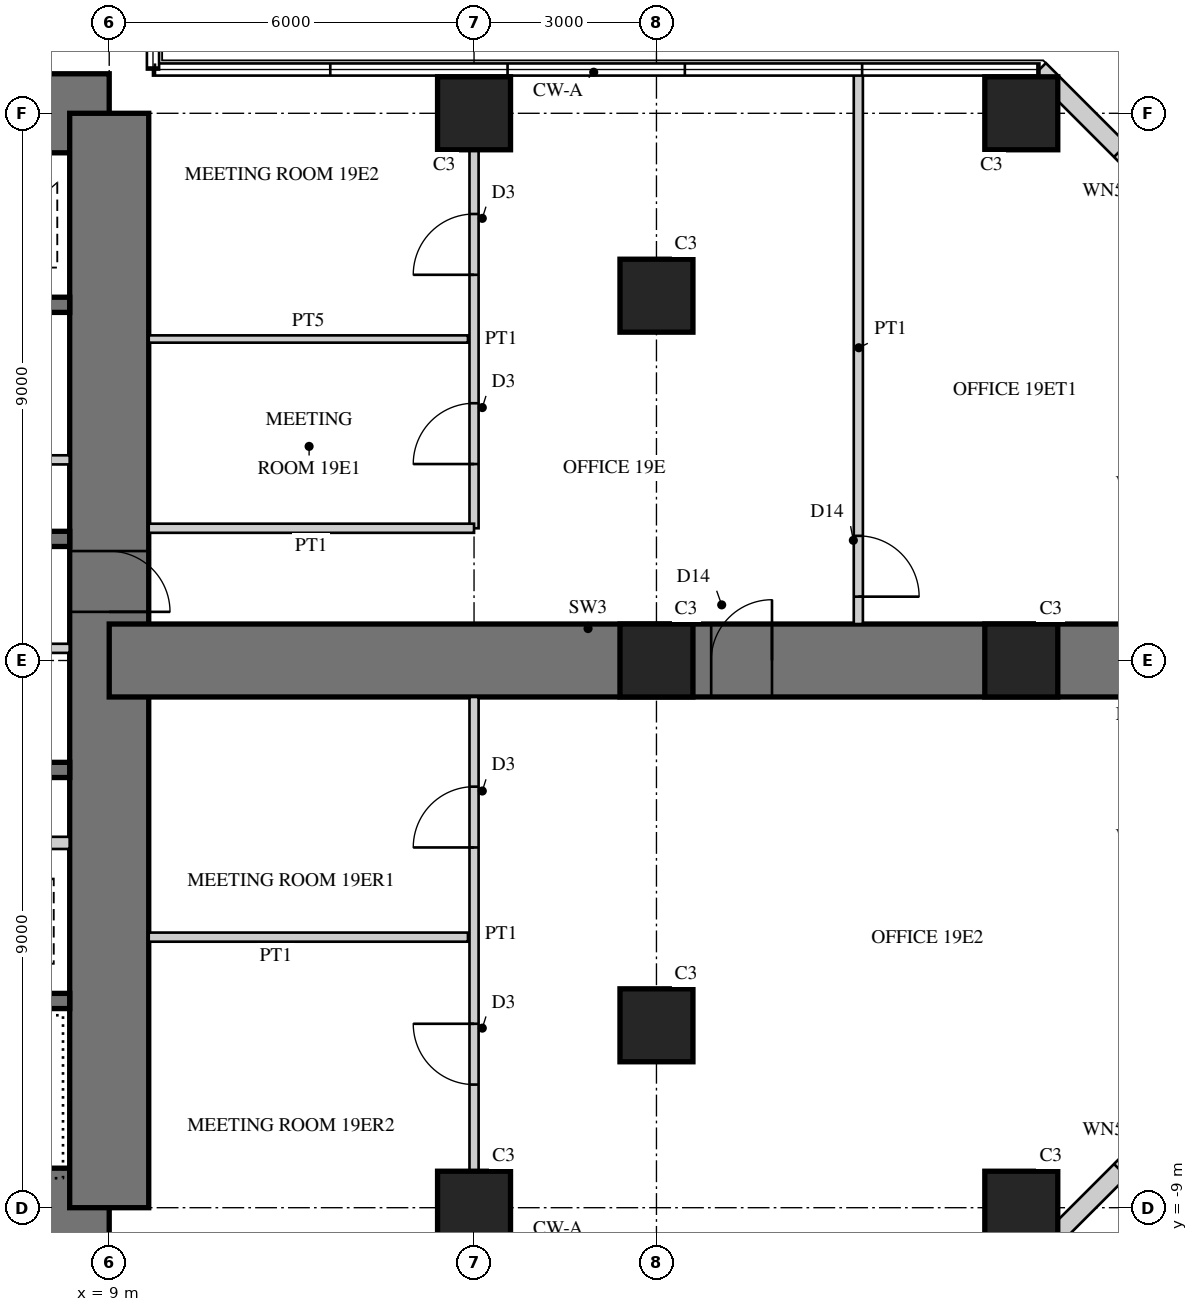
"""IFC4 building model, lengths in metres.
Left out: names, types, materials, properties, quantities, classifications, styles, units other than length and angle.
Written with IfcOpenShell. Run it as: python <this file> out.ifc"""

import sys

from ifc_helpers import new_model, si_unit, direction, frame, frame_2d, origin, origin_2d, place, context, subcontext, project, spatial, rectangle, extrude, element, fill, save


model = new_model("IFC4")
c1 = context("Model", 3, precision=1e-05, world=origin(), true_north=direction((0.0, 1.0)))
c2 = subcontext(c1, "Body", "Model", "MODEL_VIEW")
j1 = project(units=[si_unit("LENGTHUNIT", "METRE"), si_unit("PLANEANGLEUNIT", "RADIAN")], contexts=[c1])
p1 = place(None, origin())
s1 = spatial("IfcSite", under=j1, at=p1, CompositionType="ELEMENT")
p2 = place(p1, origin())
s2 = spatial("IfcBuilding", under=s1, at=p2, CompositionType="ELEMENT")
p3 = place(p2, frame((0.0, 0.0, 79.5)))
s3 = spatial("IfcBuildingStorey", under=s2, at=p3, CompositionType="ELEMENT", Elevation=79.5)
p4 = place(p3, frame((9.0, 9.0, 0.0), z_axis=(0.0, 0.0, 1.0), x_axis=(-1.0, 0.0, 0.0)))
e1 = element("IfcWall", 1, at=p4, inside=s3, PredefinedType="SHEAR", context=c2, shape_type="SweptSolid", body=[
    extrude(rectangle(XDim=18.0, YDim=1.3, at=frame_2d((9.0, 0.0))), origin(), (0.0, 0.0, 1.0), 4.0),
])
p5 = place(p4, frame((9.8, 0.0, 0.0)))
e2 = element("IfcOpeningElement", 2, at=p5, cuts=e1, PredefinedType="OPENING", context=c2, shape_type="SweptSolid", body=[
    extrude(rectangle(XDim=1.0, YDim=2.4, at=frame_2d((0.5, 1.2))), frame((0.0, 0.66, 0.0), z_axis=(0.0, -1.0, 0.0), x_axis=(1.0, 0.0, 0.0)), (0.0, 0.0, 1.0), 1.32),
])
p6 = place(p3, frame((-9.0, -9.0, 0.0), z_axis=(0.0, 0.0, 1.0), x_axis=(1.0, 0.0, 0.0)))
e3 = element("IfcWall", 3, at=p6, inside=s3, PredefinedType="SHEAR", context=c2, shape_type="SweptSolid", body=[
    extrude(rectangle(XDim=18.0, YDim=1.3, at=frame_2d((9.0, 0.0))), origin(), (0.0, 0.0, 1.0), 4.0),
])
p7 = place(p6, frame((9.8, 0.0, 0.0)))
e4 = element("IfcOpeningElement", 4, at=p7, cuts=e3, PredefinedType="OPENING", context=c2, shape_type="SweptSolid", body=[
    extrude(rectangle(XDim=1.0, YDim=2.4, at=frame_2d((0.5, 1.2))), frame((0.0, 0.66, 0.0), z_axis=(0.0, -1.0, 0.0), x_axis=(1.0, 0.0, 0.0)), (0.0, 0.0, 1.0), 1.32),
])
p8 = place(p3, frame((9.0, -9.0, 0.0), z_axis=(0.0, 0.0, 1.0), x_axis=(0.0, 1.0, 0.0)))
e5 = element("IfcWall", 5, at=p8, inside=s3, PredefinedType="SHEAR", context=c2, shape_type="SweptSolid", body=[
    extrude(rectangle(XDim=18.0, YDim=1.3, at=frame_2d((9.0, 0.0))), origin(), (0.0, 0.0, 1.0), 4.0),
])
p9 = place(p8, frame((9.8, 0.0, 0.0)))
e6 = element("IfcOpeningElement", 6, at=p9, cuts=e5, PredefinedType="OPENING", context=c2, shape_type="SweptSolid", body=[
    extrude(rectangle(XDim=1.0, YDim=2.4, at=frame_2d((0.5, 1.2))), frame((0.0, 0.66, 0.0), z_axis=(0.0, -1.0, 0.0), x_axis=(1.0, 0.0, 0.0)), (0.0, 0.0, 1.0), 1.32),
])
p10 = place(p3, frame((1.925, 2.0, 0.0), z_axis=(0.0, 0.0, 1.0), x_axis=(1.0, 0.0, 0.0)))
e7 = element("IfcWall", 7, at=p10, inside=s3, PredefinedType="SHEAR", context=c2, shape_type="SweptSolid", body=[
    extrude(rectangle(XDim=6.425, YDim=0.25, at=frame_2d((3.212, 0.0))), origin(), (0.0, 0.0, 1.0), 4.0),
])
p11 = place(p3, frame((1.925, 5.85, 0.0), z_axis=(0.0, 0.0, 1.0), x_axis=(1.0, 0.0, 0.0)))
e8 = element("IfcWall", 8, at=p11, inside=s3, PredefinedType="SHEAR", context=c2, shape_type="SweptSolid", body=[
    extrude(rectangle(XDim=6.425, YDim=0.25, at=frame_2d((3.212, 0.0))), origin(), (0.0, 0.0, 1.0), 4.0),
])
p12 = place(p11, frame((0.454, 0.0, 0.0)))
e9 = element("IfcOpeningElement", 9, at=p12, cuts=e8, PredefinedType="OPENING", context=c2, shape_type="SweptSolid", body=[
    extrude(rectangle(XDim=1.1, YDim=2.2, at=frame_2d((0.55, 1.1))), frame((0.0, 0.135, 0.0), z_axis=(0.0, -1.0, 0.0), x_axis=(1.0, 0.0, 0.0)), (0.0, 0.0, 1.0), 0.27),
])
p13 = place(p11, frame((2.663, 0.0, 0.0)))
e10 = element("IfcOpeningElement", 10, at=p13, cuts=e8, PredefinedType="OPENING", context=c2, shape_type="SweptSolid", body=[
    extrude(rectangle(XDim=1.1, YDim=2.2, at=frame_2d((0.55, 1.1))), frame((0.0, 0.135, 0.0), z_axis=(0.0, -1.0, 0.0), x_axis=(1.0, 0.0, 0.0)), (0.0, 0.0, 1.0), 0.27),
])
p14 = place(p11, frame((4.871, 0.0, 0.0)))
e11 = element("IfcOpeningElement", 11, at=p14, cuts=e8, PredefinedType="OPENING", context=c2, shape_type="SweptSolid", body=[
    extrude(rectangle(XDim=1.1, YDim=2.2, at=frame_2d((0.55, 1.1))), frame((0.0, 0.135, 0.0), z_axis=(0.0, -1.0, 0.0), x_axis=(1.0, 0.0, 0.0)), (0.0, 0.0, 1.0), 0.27),
])
p15 = place(p3, frame((1.925, 3.3, 0.0), z_axis=(0.0, 0.0, 1.0), x_axis=(1.0, 0.0, 0.0)))
e12 = element("IfcWall", 12, at=p15, inside=s3, PredefinedType="PARTITIONING", context=c2, shape_type="SweptSolid", body=[
    extrude(rectangle(XDim=6.425, YDim=0.15, at=frame_2d((3.212, 0.0))), origin(), (0.0, 0.0, 1.0), 4.0),
])
p16 = place(p15, frame((0.075, 0.0, 0.0)))
e13 = element("IfcOpeningElement", 13, at=p16, cuts=e12, PredefinedType="OPENING", context=c2, shape_type="SweptSolid", body=[
    extrude(rectangle(XDim=0.8, YDim=2.1, at=frame_2d((0.4, 1.05))), frame((0.0, 0.085, 0.0), z_axis=(0.0, -1.0, 0.0), x_axis=(1.0, 0.0, 0.0)), (0.0, 0.0, 1.0), 0.17),
])
p17 = place(p15, frame((3.675, 0.0, 0.0)))
e14 = element("IfcOpeningElement", 14, at=p17, cuts=e12, PredefinedType="OPENING", context=c2, shape_type="SweptSolid", body=[
    extrude(rectangle(XDim=0.8, YDim=2.1, at=frame_2d((0.4, 1.05))), frame((0.0, 0.085, 0.0), z_axis=(0.0, -1.0, 0.0), x_axis=(1.0, 0.0, 0.0)), (0.0, 0.0, 1.0), 0.17),
])
p18 = place(p3, frame((2.125, -1.8, 0.0), z_axis=(0.0, 0.0, 1.0), x_axis=(1.0, 0.0, 0.0)))
e15 = element("IfcWall", 15, at=p18, inside=s3, PredefinedType="SHEAR", context=c2, shape_type="SweptSolid", body=[
    extrude(rectangle(XDim=6.225, YDim=0.25, at=frame_2d((3.113, 0.0))), origin(), (0.0, 0.0, 1.0), 4.0),
])
p19 = place(p3, frame((2.125, -5.6, 0.0), z_axis=(0.0, 0.0, 1.0), x_axis=(1.0, 0.0, 0.0)))
e16 = element("IfcWall", 16, at=p19, inside=s3, PredefinedType="SHEAR", context=c2, shape_type="SweptSolid", body=[
    extrude(rectangle(XDim=6.225, YDim=0.25, at=frame_2d((3.113, 0.0))), origin(), (0.0, 0.0, 1.0), 4.0),
])
p20 = place(p19, frame((0.175, 0.0, 0.0)))
e17 = element("IfcOpeningElement", 17, at=p20, cuts=e16, PredefinedType="OPENING", context=c2, shape_type="SweptSolid", body=[
    extrude(rectangle(XDim=1.0, YDim=2.1, at=frame_2d((0.5, 1.05))), frame((0.0, 0.135, 0.0), z_axis=(0.0, -1.0, 0.0), x_axis=(1.0, 0.0, 0.0)), (0.0, 0.0, 1.0), 0.27),
])
p21 = place(p3, frame((5.725, -3.0, 0.0), z_axis=(0.0, 0.0, 1.0), x_axis=(1.0, 0.0, 0.0)))
e18 = element("IfcWall", 18, at=p21, inside=s3, PredefinedType="PARTITIONING", context=c2, shape_type="SweptSolid", body=[
    extrude(rectangle(XDim=2.625, YDim=0.2, at=frame_2d((1.312, 0.0))), origin(), (0.0, 0.0, 1.0), 4.0),
])
p22 = place(p3, frame((9.0, 0.0, 0.0), z_axis=(0.0, 0.0, 1.0), x_axis=(1.0, 0.0, 0.0)))
e19 = element("IfcWall", 19, at=p22, inside=s3, PredefinedType="SHEAR", context=c2, shape_type="SweptSolid", body=[
    extrude(rectangle(XDim=18.0, YDim=1.2, at=frame_2d((9.0, 0.0))), origin(), (0.0, 0.0, 1.0), 4.0),
])
p23 = place(p22, frame((9.9, 0.0, 0.0)))
e20 = element("IfcOpeningElement", 20, at=p23, cuts=e19, PredefinedType="OPENING", context=c2, shape_type="SweptSolid", body=[
    extrude(rectangle(XDim=1.0, YDim=2.2, at=frame_2d((0.5, 1.1))), frame((0.0, 0.61, 0.0), z_axis=(0.0, -1.0, 0.0), x_axis=(1.0, 0.0, 0.0)), (0.0, 0.0, 1.0), 1.22),
])
for number, where, z_axis, x_axis in (
    (21, (15.0, -9.0, 0.0), (0.0, 0.0, 1.0), (1.0, 0.0, 0.0)),
    (22, (24.0, -9.0, 0.0), (0.0, 0.0, 1.0), (1.0, 0.0, 0.0)),
    (23, (15.0, 9.0, 0.0), (0.0, 0.0, 1.0), (1.0, 0.0, 0.0)),
    (24, (24.0, 9.0, 0.0), (0.0, 0.0, 1.0), (1.0, 0.0, 0.0)),
    (25, (18.0, -6.0, 0.0), (0.0, 0.0, 1.0), (1.0, 0.0, 0.0)),
    (26, (18.0, 0.0, 0.0), (0.0, 0.0, 1.0), (1.0, 0.0, 0.0)),
    (27, (18.0, 6.0, 0.0), (0.0, 0.0, 1.0), (1.0, 0.0, 0.0)),
    (28, (24.0, 0.0, 0.0), (0.0, 0.0, 1.0), (1.0, 0.0, 0.0)),
):
    element("IfcColumn", number, at=place(p3, frame(where, z_axis=z_axis, x_axis=x_axis)), inside=s3, PredefinedType="COLUMN", context=c2, shape_type="SweptSolid", body=[
        extrude(rectangle(XDim=1.2, YDim=1.2, at=origin_2d()), origin(), (0.0, 0.0, 1.0), 4.0),
    ])
p24 = place(p3, frame((24.298, -9.72, 0.0), z_axis=(0.0, 0.0, 1.0), x_axis=(0.707106781187, 0.707106781187, 0.0)))
e29 = element("IfcWall", 29, at=p24, inside=s3, PredefinedType="SOLIDWALL", context=c2, shape_type="SweptSolid", body=[
    extrude(rectangle(XDim=4.669, YDim=0.3, at=frame_2d((2.335, 0.0))), origin(), (0.0, 0.0, 1.0), 3.8),
])
p25 = place(p24, frame((1.885, 0.0, 0.3)))
e30 = element("IfcOpeningElement", 30, at=p25, cuts=e29, PredefinedType="OPENING", context=c2, shape_type="SweptSolid", body=[
    extrude(rectangle(XDim=0.9, YDim=2.4, at=frame_2d((0.45, 1.2))), frame((0.0, 0.16, 0.0), z_axis=(0.0, -1.0, 0.0), x_axis=(1.0, 0.0, 0.0)), (0.0, 0.0, 1.0), 0.32),
])
p26 = place(p3, frame((27.6, 6.418, 0.0), z_axis=(0.0, 0.0, 1.0), x_axis=(-0.707106781187, 0.707106781187, 0.0)))
e31 = element("IfcWall", 31, at=p26, inside=s3, PredefinedType="SOLIDWALL", context=c2, shape_type="SweptSolid", body=[
    extrude(rectangle(XDim=4.669, YDim=0.3, at=frame_2d((2.335, 0.0))), origin(), (0.0, 0.0, 1.0), 3.8),
])
p27 = place(p26, frame((1.885, 0.0, 0.3)))
e32 = element("IfcOpeningElement", 32, at=p27, cuts=e31, PredefinedType="OPENING", context=c2, shape_type="SweptSolid", body=[
    extrude(rectangle(XDim=0.9, YDim=2.4, at=frame_2d((0.45, 1.2))), frame((0.0, 0.16, 0.0), z_axis=(0.0, -1.0, 0.0), x_axis=(1.0, 0.0, 0.0)), (0.0, 0.0, 1.0), 0.32),
])
p28 = place(p3, frame((2.325, 0.2, 0.0), z_axis=(0.0, 0.0, 1.0), x_axis=(1.0, 0.0, 0.0)))
e33 = element("IfcWall", 33, at=p28, inside=s3, PredefinedType="PARTITIONING", context=c2, shape_type="SweptSolid", body=[
    extrude(rectangle(XDim=6.025, YDim=0.15, at=frame_2d((3.013, 0.0))), origin(), (0.0, 0.0, 1.0), 3.8),
])
p29 = place(p28, frame((0.4, 0.0, 0.0)))
e34 = element("IfcOpeningElement", 34, at=p29, cuts=e33, PredefinedType="OPENING", context=c2, shape_type="SweptSolid", body=[
    extrude(rectangle(XDim=1.0, YDim=2.1, at=frame_2d((0.5, 1.05))), frame((0.0, 0.085, 0.0), z_axis=(0.0, -1.0, 0.0), x_axis=(1.0, 0.0, 0.0)), (0.0, 0.0, 1.0), 0.17),
])
p30 = place(p3, frame((15.0, 2.175, 0.0), z_axis=(0.0, 0.0, 1.0), x_axis=(0.0, 1.0, 0.0)))
e35 = element("IfcWall", 35, at=p30, inside=s3, PredefinedType="PARTITIONING", context=c2, shape_type="SweptSolid", body=[
    extrude(rectangle(XDim=6.225, YDim=0.15, at=frame_2d((3.112, 0.0))), origin(), (0.0, 0.0, 1.0), 2.95),
])
p31 = place(p30, frame((1.056, 0.0, 0.0)))
e36 = element("IfcOpeningElement", 36, at=p31, cuts=e35, PredefinedType="OPENING", context=c2, shape_type="SweptSolid", body=[
    extrude(rectangle(XDim=1.0, YDim=2.1, at=frame_2d((0.5, 1.05))), frame((0.0, 0.085, 0.0), z_axis=(0.0, -1.0, 0.0), x_axis=(1.0, 0.0, 0.0)), (0.0, 0.0, 1.0), 0.17),
])
p32 = place(p30, frame((4.169, 0.0, 0.0)))
e37 = element("IfcOpeningElement", 37, at=p32, cuts=e35, PredefinedType="OPENING", context=c2, shape_type="SweptSolid", body=[
    extrude(rectangle(XDim=1.0, YDim=2.1, at=frame_2d((0.5, 1.05))), frame((0.0, 0.085, 0.0), z_axis=(0.0, -1.0, 0.0), x_axis=(1.0, 0.0, 0.0)), (0.0, 0.0, 1.0), 0.17),
])
p33 = place(p3, frame((9.65, 2.175, 0.0), z_axis=(0.0, 0.0, 1.0), x_axis=(1.0, 0.0, 0.0)))
e38 = element("IfcWall", 38, at=p33, inside=s3, PredefinedType="PARTITIONING", context=c2, shape_type="SweptSolid", body=[
    extrude(rectangle(XDim=5.35, YDim=0.15, at=frame_2d((2.675, 0.0))), origin(), (0.0, 0.0, 1.0), 3.8),
])
p34 = place(p3, frame((9.65, 5.288, 0.0), z_axis=(0.0, 0.0, 1.0), x_axis=(1.0, 0.0, 0.0)))
e39 = element("IfcWall", 39, at=p34, inside=s3, PredefinedType="PLUMBINGWALL", context=c2, shape_type="SweptSolid", body=[
    extrude(rectangle(XDim=5.25, YDim=0.12, at=frame_2d((2.625, 0.0))), origin(), (0.0, 0.0, 1.0), 3.8),
])
p35 = place(p3, frame((15.0, -8.4, 0.0), z_axis=(0.0, 0.0, 1.0), x_axis=(0.0, 1.0, 0.0)))
e40 = element("IfcWall", 40, at=p35, inside=s3, PredefinedType="PARTITIONING", context=c2, shape_type="SweptSolid", body=[
    extrude(rectangle(XDim=7.8, YDim=0.15, at=frame_2d((3.9, 0.0))), origin(), (0.0, 0.0, 1.0), 2.95),
])
p36 = place(p35, frame((1.425, 0.0, 0.0)))
e41 = element("IfcOpeningElement", 41, at=p36, cuts=e40, PredefinedType="OPENING", context=c2, shape_type="SweptSolid", body=[
    extrude(rectangle(XDim=1.0, YDim=2.1, at=frame_2d((0.5, 1.05))), frame((0.0, 0.085, 0.0), z_axis=(0.0, -1.0, 0.0), x_axis=(1.0, 0.0, 0.0)), (0.0, 0.0, 1.0), 0.17),
])
p37 = place(p35, frame((5.325, 0.0, 0.0)))
e42 = element("IfcOpeningElement", 42, at=p37, cuts=e40, PredefinedType="OPENING", context=c2, shape_type="SweptSolid", body=[
    extrude(rectangle(XDim=1.0, YDim=2.1, at=frame_2d((0.5, 1.05))), frame((0.0, 0.085, 0.0), z_axis=(0.0, -1.0, 0.0), x_axis=(1.0, 0.0, 0.0)), (0.0, 0.0, 1.0), 0.17),
])
p38 = place(p3, frame((9.65, -4.55, 0.0), z_axis=(0.0, 0.0, 1.0), x_axis=(1.0, 0.0, 0.0)))
e43 = element("IfcWall", 43, at=p38, inside=s3, PredefinedType="PARTITIONING", context=c2, shape_type="SweptSolid", body=[
    extrude(rectangle(XDim=5.25, YDim=0.15, at=frame_2d((2.625, 0.0))), origin(), (0.0, 0.0, 1.0), 3.8),
])
p39 = place(p3, frame((21.32, 0.6, 0.0), z_axis=(0.0, 0.0, 1.0), x_axis=(0.0, 1.0, 0.0)))
e44 = element("IfcWall", 44, at=p39, inside=s3, PredefinedType="PARTITIONING", context=c2, shape_type="SweptSolid", body=[
    extrude(rectangle(XDim=9.08, YDim=0.15, at=frame_2d((4.54, 0.0))), origin(), (0.0, 0.0, 1.0), 3.8),
])
p40 = place(p39, frame((0.45, 0.0, 0.0)))
e45 = element("IfcOpeningElement", 45, at=p40, cuts=e44, PredefinedType="OPENING", context=c2, shape_type="SweptSolid", body=[
    extrude(rectangle(XDim=1.0, YDim=2.2, at=frame_2d((0.5, 1.1))), frame((0.0, 0.085, 0.0), z_axis=(0.0, -1.0, 0.0), x_axis=(1.0, 0.0, 0.0)), (0.0, 0.0, 1.0), 0.17),
])
p41 = place(p31, origin())
e46 = element("IfcDoor", 46, at=p41, inside=s3, OperationType="SINGLE_SWING_LEFT", PredefinedType="DOOR", context=c2, shape_type="SweptSolid", body=[
    extrude(rectangle(XDim=1.0, YDim=2.1, at=frame_2d((0.5, 1.05))), frame((0.0, 0.025, 0.0), z_axis=(0.0, -1.0, 0.0), x_axis=(1.0, 0.0, 0.0)), (0.0, 0.0, 1.0), 0.05),
])
fill(e36, e46)
p42 = place(p32, origin())
e47 = element("IfcDoor", 47, at=p42, inside=s3, OperationType="SINGLE_SWING_LEFT", PredefinedType="DOOR", context=c2, shape_type="SweptSolid", body=[
    extrude(rectangle(XDim=1.0, YDim=2.1, at=frame_2d((0.5, 1.05))), frame((0.0, 0.025, 0.0), z_axis=(0.0, -1.0, 0.0), x_axis=(1.0, 0.0, 0.0)), (0.0, 0.0, 1.0), 0.05),
])
fill(e37, e47)
p43 = place(p36, origin())
e48 = element("IfcDoor", 48, at=p43, inside=s3, OperationType="SINGLE_SWING_RIGHT", PredefinedType="DOOR", context=c2, shape_type="SweptSolid", body=[
    extrude(rectangle(XDim=1.0, YDim=2.1, at=frame_2d((0.5, 1.05))), frame((0.0, 0.025, 0.0), z_axis=(0.0, -1.0, 0.0), x_axis=(1.0, 0.0, 0.0)), (0.0, 0.0, 1.0), 0.05),
])
fill(e41, e48)
p44 = place(p37, origin())
e49 = element("IfcDoor", 49, at=p44, inside=s3, OperationType="SINGLE_SWING_LEFT", PredefinedType="DOOR", context=c2, shape_type="SweptSolid", body=[
    extrude(rectangle(XDim=1.0, YDim=2.1, at=frame_2d((0.5, 1.05))), frame((0.0, 0.025, 0.0), z_axis=(0.0, -1.0, 0.0), x_axis=(1.0, 0.0, 0.0)), (0.0, 0.0, 1.0), 0.05),
])
fill(e42, e49)
p45 = place(p40, frame((1.0, 0.0, 0.0), z_axis=(0.0, 0.0, 1.0), x_axis=(-1.0, 0.0, 0.0)))
e50 = element("IfcDoor", 50, at=p45, inside=s3, OperationType="SINGLE_SWING_RIGHT", PredefinedType="DOOR", context=c2, shape_type="SweptSolid", body=[
    extrude(rectangle(XDim=1.0, YDim=2.2, at=frame_2d((0.5, 1.1))), frame((0.0, 0.025, 0.0), z_axis=(0.0, -1.0, 0.0), x_axis=(1.0, 0.0, 0.0)), (0.0, 0.0, 1.0), 0.05),
])
fill(e45, e50)
p46 = place(p23, origin())
e51 = element("IfcDoor", 51, at=p46, inside=s3, OperationType="SINGLE_SWING_RIGHT", PredefinedType="DOOR", context=c2, shape_type="SweptSolid", body=[
    extrude(rectangle(XDim=1.0, YDim=2.2, at=frame_2d((0.5, 1.1))), frame((0.0, 0.025, 0.0), z_axis=(0.0, -1.0, 0.0), x_axis=(1.0, 0.0, 0.0)), (0.0, 0.0, 1.0), 0.05),
])
fill(e20, e51)
p47 = place(p9, frame((1.0, 0.0, 0.0), z_axis=(0.0, 0.0, 1.0), x_axis=(-1.0, 0.0, 0.0)))
e52 = element("IfcDoor", 52, at=p47, inside=s3, OperationType="SINGLE_SWING_RIGHT", PredefinedType="DOOR", context=c2, shape_type="SweptSolid", body=[
    extrude(rectangle(XDim=1.0, YDim=2.4, at=frame_2d((0.5, 1.2))), frame((0.0, -0.005, 0.0), z_axis=(0.0, -1.0, 0.0), x_axis=(1.0, 0.0, 0.0)), (0.0, 0.0, 1.0), 0.05),
])
fill(e6, e52)
save(model, sys.argv[1])
